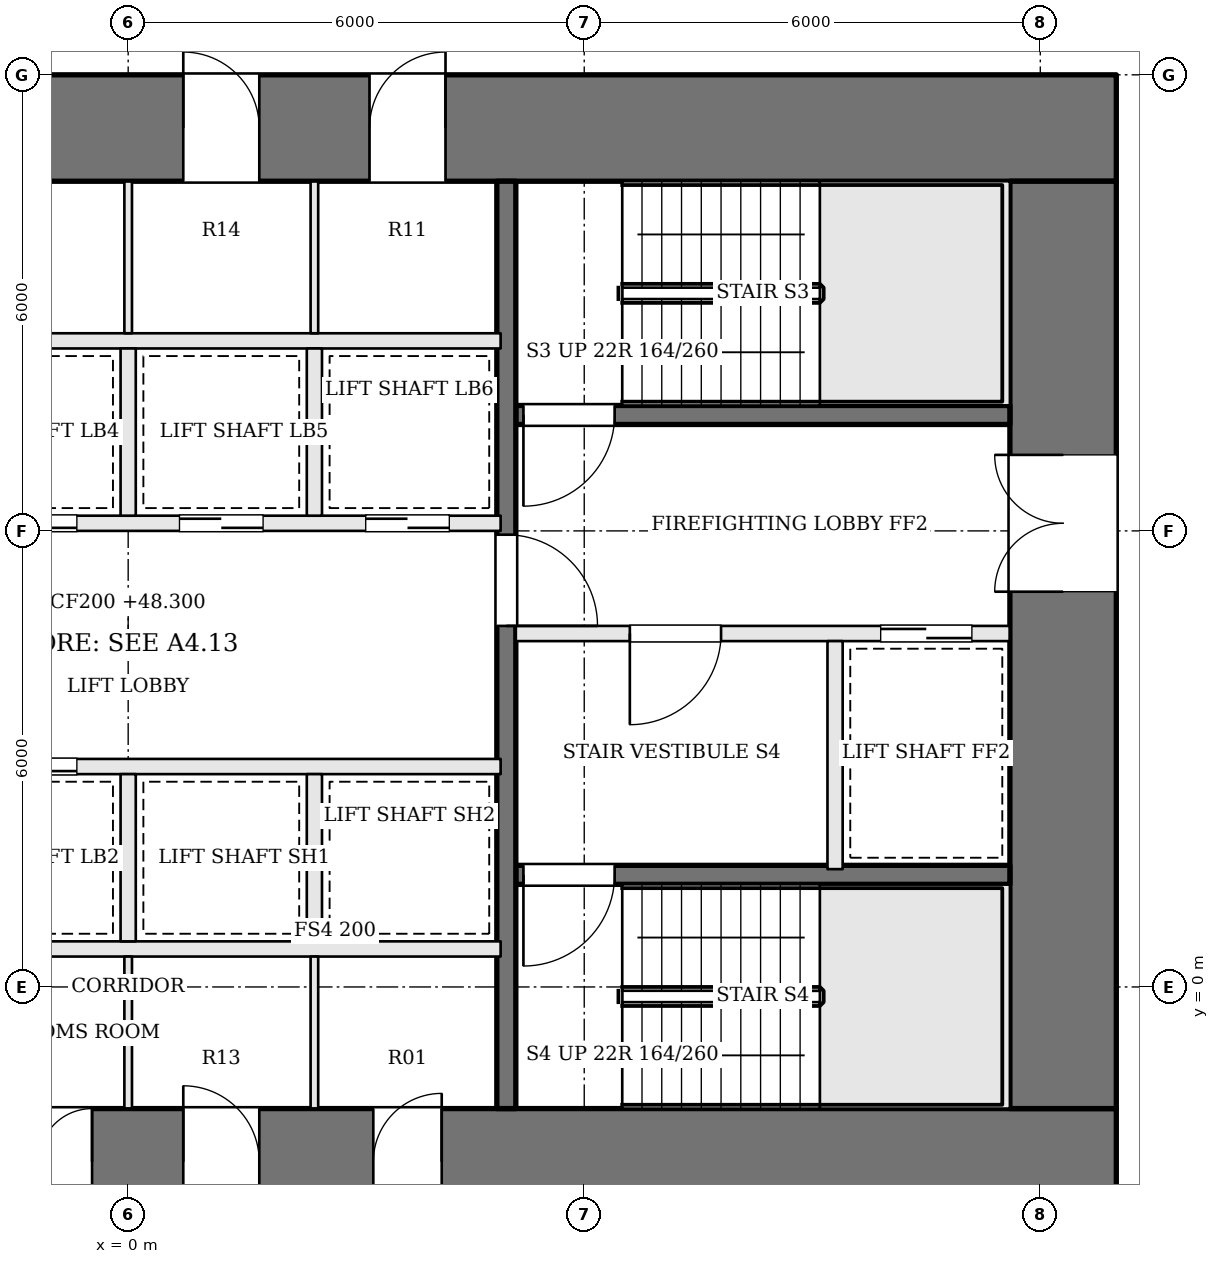
"""IFC4 building model, lengths in metres.
Left out: names, types, materials, properties, quantities, classifications, styles, units other than length and angle.
Written with IfcOpenShell. Run it as: python <this file> out.ifc"""

import sys

from ifc_helpers import new_model, si_unit, direction, frame, frame_2d, origin, place, context, subcontext, project, spatial, rectangle, extrude, element, fill, save


model = new_model("IFC4")
c1 = context("Model", 3, precision=1e-05, world=origin(), true_north=direction((0.0, 1.0)))
c2 = subcontext(c1, "Body", "Model", "MODEL_VIEW")
j1 = project(units=[si_unit("LENGTHUNIT", "METRE"), si_unit("PLANEANGLEUNIT", "RADIAN")], contexts=[c1])
p1 = place(None, origin())
s1 = spatial("IfcSite", under=j1, at=p1, CompositionType="ELEMENT")
p2 = place(p1, origin())
s2 = spatial("IfcBuilding", under=s1, at=p2, CompositionType="ELEMENT")
p3 = place(p2, frame((0.0, 0.0, 48.3)))
s3 = spatial("IfcBuildingStorey", under=s2, at=p3, CompositionType="ELEMENT", Elevation=48.3)
p4 = place(p3, frame((-13.0, 11.3, 0.0), z_axis=(0.0, 0.0, 1.0), x_axis=(1.0, 0.0, 0.0)))
e1 = element("IfcWall", 1, at=p4, inside=s3, PredefinedType="SHEAR", context=c2, shape_type="SweptSolid", body=[
    extrude(rectangle(XDim=26.0, YDim=1.4, at=frame_2d((13.0, 0.0))), origin(), (0.0, 0.0, 1.0), 3.6),
])
p5 = place(p4, frame((8.575, 0.0, 0.0)))
e2 = element("IfcOpeningElement", 2, at=p5, cuts=e1, PredefinedType="OPENING", context=c2, shape_type="SweptSolid", body=[
    extrude(rectangle(XDim=0.7, YDim=2.1, at=frame_2d((0.35, 1.05))), frame((0.0, 0.71, 0.0), z_axis=(0.0, -1.0, 0.0), x_axis=(1.0, 0.0, 0.0)), (0.0, 0.0, 1.0), 1.42),
])
p6 = place(p4, frame((10.875, 0.0, 0.0)))
e3 = element("IfcOpeningElement", 3, at=p6, cuts=e1, PredefinedType="OPENING", context=c2, shape_type="SweptSolid", body=[
    extrude(rectangle(XDim=1.0, YDim=2.1, at=frame_2d((0.5, 1.05))), frame((0.0, 0.71, 0.0), z_axis=(0.0, -1.0, 0.0), x_axis=(1.0, 0.0, 0.0)), (0.0, 0.0, 1.0), 1.42),
])
p7 = place(p4, frame((13.725, 0.0, 0.0)))
e4 = element("IfcOpeningElement", 4, at=p7, cuts=e1, PredefinedType="OPENING", context=c2, shape_type="SweptSolid", body=[
    extrude(rectangle(XDim=1.0, YDim=2.1, at=frame_2d((0.5, 1.05))), frame((0.0, 0.71, 0.0), z_axis=(0.0, -1.0, 0.0), x_axis=(1.0, 0.0, 0.0)), (0.0, 0.0, 1.0), 1.42),
])
p8 = place(p4, frame((16.175, 0.0, 0.0)))
e5 = element("IfcOpeningElement", 5, at=p8, cuts=e1, PredefinedType="OPENING", context=c2, shape_type="SweptSolid", body=[
    extrude(rectangle(XDim=1.0, YDim=2.1, at=frame_2d((0.5, 1.05))), frame((0.0, 0.71, 0.0), z_axis=(0.0, -1.0, 0.0), x_axis=(1.0, 0.0, 0.0)), (0.0, 0.0, 1.0), 1.42),
])
p9 = place(p3, frame((-13.0, -2.3, 0.0), z_axis=(0.0, 0.0, 1.0), x_axis=(1.0, 0.0, 0.0)))
e6 = element("IfcWall", 6, at=p9, inside=s3, PredefinedType="SHEAR", context=c2, shape_type="SweptSolid", body=[
    extrude(rectangle(XDim=26.0, YDim=1.4, at=frame_2d((13.0, 0.0))), origin(), (0.0, 0.0, 1.0), 3.6),
])
p10 = place(p9, frame((9.225, 0.0, 0.0)))
e7 = element("IfcOpeningElement", 7, at=p10, cuts=e6, PredefinedType="OPENING", context=c2, shape_type="SweptSolid", body=[
    extrude(rectangle(XDim=1.0, YDim=2.1, at=frame_2d((0.5, 1.05))), frame((0.0, 0.71, 0.0), z_axis=(0.0, -1.0, 0.0), x_axis=(1.0, 0.0, 0.0)), (0.0, 0.0, 1.0), 1.42),
])
p11 = place(p9, frame((11.825, 0.0, 0.0)))
e8 = element("IfcOpeningElement", 8, at=p11, cuts=e6, PredefinedType="OPENING", context=c2, shape_type="SweptSolid", body=[
    extrude(rectangle(XDim=0.7, YDim=2.1, at=frame_2d((0.35, 1.05))), frame((0.0, 0.71, 0.0), z_axis=(0.0, -1.0, 0.0), x_axis=(1.0, 0.0, 0.0)), (0.0, 0.0, 1.0), 1.42),
])
p12 = place(p9, frame((13.725, 0.0, 0.0)))
e9 = element("IfcOpeningElement", 9, at=p12, cuts=e6, PredefinedType="OPENING", context=c2, shape_type="SweptSolid", body=[
    extrude(rectangle(XDim=1.0, YDim=2.1, at=frame_2d((0.5, 1.05))), frame((0.0, 0.71, 0.0), z_axis=(0.0, -1.0, 0.0), x_axis=(1.0, 0.0, 0.0)), (0.0, 0.0, 1.0), 1.42),
])
p13 = place(p9, frame((16.225, 0.0, 0.0)))
e10 = element("IfcOpeningElement", 10, at=p13, cuts=e6, PredefinedType="OPENING", context=c2, shape_type="SweptSolid", body=[
    extrude(rectangle(XDim=0.9, YDim=2.1, at=frame_2d((0.45, 1.05))), frame((0.0, 0.71, 0.0), z_axis=(0.0, -1.0, 0.0), x_axis=(1.0, 0.0, 0.0)), (0.0, 0.0, 1.0), 1.42),
])
p14 = place(p3, frame((12.3, -1.6, 0.0), z_axis=(0.0, 0.0, 1.0), x_axis=(0.0, 1.0, 0.0)))
e11 = element("IfcWall", 11, at=p14, inside=s3, PredefinedType="SHEAR", context=c2, shape_type="SweptSolid", body=[
    extrude(rectangle(XDim=12.2, YDim=1.4, at=frame_2d((6.1, 0.0))), origin(), (0.0, 0.0, 1.0), 3.6),
])
p15 = place(p14, frame((6.8, 0.0, 0.0)))
e12 = element("IfcOpeningElement", 12, at=p15, cuts=e11, PredefinedType="OPENING", context=c2, shape_type="SweptSolid", body=[
    extrude(rectangle(XDim=1.8, YDim=2.1, at=frame_2d((0.9, 1.05))), frame((0.0, 0.71, 0.0), z_axis=(0.0, -1.0, 0.0), x_axis=(1.0, 0.0, 0.0)), (0.0, 0.0, 1.0), 1.42),
])
p16 = place(p3, frame((11.6, 7.525, 0.0), z_axis=(0.0, 0.0, 1.0), x_axis=(-1.0, 0.0, 0.0)))
e13 = element("IfcWall", 13, at=p16, inside=s3, PredefinedType="SOLIDWALL", context=c2, shape_type="SweptSolid", body=[
    extrude(rectangle(XDim=6.5, YDim=0.25, at=frame_2d((3.25, 0.0))), origin(), (0.0, 0.0, 1.0), 3.4),
])
p17 = place(p16, frame((5.2, 0.0, 0.0)))
e14 = element("IfcOpeningElement", 14, at=p17, cuts=e13, PredefinedType="OPENING", context=c2, shape_type="SweptSolid", body=[
    extrude(rectangle(XDim=1.2, YDim=2.1, at=frame_2d((0.6, 1.05))), frame((0.0, 0.135, 0.0), z_axis=(0.0, -1.0, 0.0), x_axis=(1.0, 0.0, 0.0)), (0.0, 0.0, 1.0), 0.27),
])
p18 = place(p3, frame((11.6, 4.65, 0.0), z_axis=(0.0, 0.0, 1.0), x_axis=(-1.0, 0.0, 0.0)))
e15 = element("IfcWall", 15, at=p18, inside=s3, PredefinedType="SOLIDWALL", context=c2, shape_type="SweptSolid", body=[
    extrude(rectangle(XDim=6.5, YDim=0.2, at=frame_2d((3.25, 0.0))), origin(), (0.0, 0.0, 1.0), 3.4),
])
p19 = place(p18, frame((3.8, 0.0, 0.0)))
e16 = element("IfcOpeningElement", 16, at=p19, cuts=e15, PredefinedType="OPENING", context=c2, shape_type="SweptSolid", body=[
    extrude(rectangle(XDim=1.2, YDim=2.1, at=frame_2d((0.6, 1.05))), frame((0.0, 0.11, 0.0), z_axis=(0.0, -1.0, 0.0), x_axis=(1.0, 0.0, 0.0)), (0.0, 0.0, 1.0), 0.22),
])
p20 = place(p18, frame((0.5, 0.0, 0.0)))
e17 = element("IfcOpeningElement", 17, at=p20, cuts=e15, PredefinedType="OPENING", context=c2, shape_type="SweptSolid", body=[
    extrude(rectangle(XDim=1.2, YDim=2.1, at=frame_2d((0.6, 1.05))), frame((0.0, 0.11, 0.0), z_axis=(0.0, -1.0, 0.0), x_axis=(1.0, 0.0, 0.0)), (0.0, 0.0, 1.0), 0.22),
])
p21 = place(p3, frame((11.6, 1.475, 0.0), z_axis=(0.0, 0.0, 1.0), x_axis=(-1.0, 0.0, 0.0)))
e18 = element("IfcWall", 18, at=p21, inside=s3, PredefinedType="SOLIDWALL", context=c2, shape_type="SweptSolid", body=[
    extrude(rectangle(XDim=6.5, YDim=0.25, at=frame_2d((3.25, 0.0))), origin(), (0.0, 0.0, 1.0), 3.4),
])
p22 = place(p21, frame((5.2, 0.0, 0.0)))
e19 = element("IfcOpeningElement", 19, at=p22, cuts=e18, PredefinedType="OPENING", context=c2, shape_type="SweptSolid", body=[
    extrude(rectangle(XDim=1.2, YDim=2.1, at=frame_2d((0.6, 1.05))), frame((0.0, 0.135, 0.0), z_axis=(0.0, -1.0, 0.0), x_axis=(1.0, 0.0, 0.0)), (0.0, 0.0, 1.0), 0.27),
])
p23 = place(p3, frame((9.3, 4.55, 0.0), z_axis=(0.0, 0.0, 1.0), x_axis=(0.0, -1.0, 0.0)))
e20 = element("IfcWall", 20, at=p23, inside=s3, PredefinedType="SOLIDWALL", context=c2, shape_type="SweptSolid", body=[
    extrude(rectangle(XDim=3.0, YDim=0.2, at=frame_2d((1.5, 0.0))), origin(), (0.0, 0.0, 1.0), 3.4),
])
p24 = place(p3, frame((4.975, 10.6, 0.0), z_axis=(0.0, 0.0, 1.0), x_axis=(0.0, -1.0, 0.0)))
e21 = element("IfcWall", 21, at=p24, inside=s3, PredefinedType="SOLIDWALL", context=c2, shape_type="SweptSolid", body=[
    extrude(rectangle(XDim=12.2, YDim=0.25, at=frame_2d((6.1, 0.0))), origin(), (0.0, 0.0, 1.0), 3.4),
])
p25 = place(p24, frame((4.65, 0.0, 0.0)))
e22 = element("IfcOpeningElement", 22, at=p25, cuts=e21, PredefinedType="OPENING", context=c2, shape_type="SweptSolid", body=[
    extrude(rectangle(XDim=1.2, YDim=2.1, at=frame_2d((0.6, 1.05))), frame((0.0, 0.135, 0.0), z_axis=(0.0, -1.0, 0.0), x_axis=(1.0, 0.0, 0.0)), (0.0, 0.0, 1.0), 0.27),
])
p26 = place(p3, frame((-4.9, 0.5, 0.0), z_axis=(0.0, 0.0, 1.0), x_axis=(1.0, 0.0, 0.0)))
e23 = element("IfcWall", 23, at=p26, inside=s3, PredefinedType="SOLIDWALL", context=c2, shape_type="SweptSolid", body=[
    extrude(rectangle(XDim=9.8, YDim=0.2, at=frame_2d((4.9, 0.0))), origin(), (0.0, 0.0, 1.0), 3.4),
])
p27 = place(p3, frame((-4.9, 2.9, 0.0), z_axis=(0.0, 0.0, 1.0), x_axis=(1.0, 0.0, 0.0)))
e24 = element("IfcWall", 24, at=p27, inside=s3, PredefinedType="SOLIDWALL", context=c2, shape_type="SweptSolid", body=[
    extrude(rectangle(XDim=9.8, YDim=0.2, at=frame_2d((4.9, 0.0))), origin(), (0.0, 0.0, 1.0), 3.4),
])
p28 = place(p27, frame((0.675, 0.0, 0.0)))
e25 = element("IfcOpeningElement", 25, at=p28, cuts=e24, PredefinedType="OPENING", context=c2, shape_type="SweptSolid", body=[
    extrude(rectangle(XDim=1.1, YDim=2.1, at=frame_2d((0.55, 1.05))), frame((0.0, 0.11, 0.0), z_axis=(0.0, -1.0, 0.0), x_axis=(1.0, 0.0, 0.0)), (0.0, 0.0, 1.0), 0.22),
])
p29 = place(p27, frame((3.125, 0.0, 0.0)))
e26 = element("IfcOpeningElement", 26, at=p29, cuts=e24, PredefinedType="OPENING", context=c2, shape_type="SweptSolid", body=[
    extrude(rectangle(XDim=1.1, YDim=2.1, at=frame_2d((0.55, 1.05))), frame((0.0, 0.11, 0.0), z_axis=(0.0, -1.0, 0.0), x_axis=(1.0, 0.0, 0.0)), (0.0, 0.0, 1.0), 0.22),
])
p30 = place(p3, frame((-4.9, 6.1, 0.0), z_axis=(0.0, 0.0, 1.0), x_axis=(1.0, 0.0, 0.0)))
e27 = element("IfcWall", 27, at=p30, inside=s3, PredefinedType="SOLIDWALL", context=c2, shape_type="SweptSolid", body=[
    extrude(rectangle(XDim=9.8, YDim=0.2, at=frame_2d((4.9, 0.0))), origin(), (0.0, 0.0, 1.0), 3.4),
])
p31 = place(p30, frame((0.675, 0.0, 0.0)))
e28 = element("IfcOpeningElement", 28, at=p31, cuts=e27, PredefinedType="OPENING", context=c2, shape_type="SweptSolid", body=[
    extrude(rectangle(XDim=1.1, YDim=2.1, at=frame_2d((0.55, 1.05))), frame((0.0, 0.11, 0.0), z_axis=(0.0, -1.0, 0.0), x_axis=(1.0, 0.0, 0.0)), (0.0, 0.0, 1.0), 0.22),
])
p32 = place(p30, frame((3.125, 0.0, 0.0)))
e29 = element("IfcOpeningElement", 29, at=p32, cuts=e27, PredefinedType="OPENING", context=c2, shape_type="SweptSolid", body=[
    extrude(rectangle(XDim=1.1, YDim=2.1, at=frame_2d((0.55, 1.05))), frame((0.0, 0.11, 0.0), z_axis=(0.0, -1.0, 0.0), x_axis=(1.0, 0.0, 0.0)), (0.0, 0.0, 1.0), 0.22),
])
p33 = place(p30, frame((5.575, 0.0, 0.0)))
e30 = element("IfcOpeningElement", 30, at=p33, cuts=e27, PredefinedType="OPENING", context=c2, shape_type="SweptSolid", body=[
    extrude(rectangle(XDim=1.1, YDim=2.1, at=frame_2d((0.55, 1.05))), frame((0.0, 0.11, 0.0), z_axis=(0.0, -1.0, 0.0), x_axis=(1.0, 0.0, 0.0)), (0.0, 0.0, 1.0), 0.22),
])
p34 = place(p30, frame((8.025, 0.0, 0.0)))
e31 = element("IfcOpeningElement", 31, at=p34, cuts=e27, PredefinedType="OPENING", context=c2, shape_type="SweptSolid", body=[
    extrude(rectangle(XDim=1.1, YDim=2.1, at=frame_2d((0.55, 1.05))), frame((0.0, 0.11, 0.0), z_axis=(0.0, -1.0, 0.0), x_axis=(1.0, 0.0, 0.0)), (0.0, 0.0, 1.0), 0.22),
])
p35 = place(p3, frame((-4.9, 8.5, 0.0), z_axis=(0.0, 0.0, 1.0), x_axis=(1.0, 0.0, 0.0)))
e32 = element("IfcWall", 32, at=p35, inside=s3, PredefinedType="SOLIDWALL", context=c2, shape_type="SweptSolid", body=[
    extrude(rectangle(XDim=9.8, YDim=0.2, at=frame_2d((4.9, 0.0))), origin(), (0.0, 0.0, 1.0), 3.4),
])
for number, where, z_axis, x_axis in (
    (33, (0.0, 0.6, 0.0), (0.0, 0.0, 1.0), (0.0, 1.0, 0.0)),
    (34, (2.45, 0.6, 0.0), (0.0, 0.0, 1.0), (0.0, 1.0, 0.0)),
    (35, (0.0, 6.2, 0.0), (0.0, 0.0, 1.0), (0.0, 1.0, 0.0)),
    (36, (2.45, 6.2, 0.0), (0.0, 0.0, 1.0), (0.0, 1.0, 0.0)),
):
    element("IfcWall", number, at=place(p3, frame(where, z_axis=z_axis, x_axis=x_axis)), inside=s3, PredefinedType="SOLIDWALL", context=c2, shape_type="SweptSolid", body=[
        extrude(rectangle(XDim=2.2, YDim=0.2, at=frame_2d((1.1, 0.0))), origin(), (0.0, 0.0, 1.0), 3.4),
    ])
for number, where, z_axis, x_axis in (
    (37, (0.0, -1.6, 0.0), (0.0, 0.0, 1.0), (0.0, 1.0, 0.0)),
    (38, (2.45, -1.6, 0.0), (0.0, 0.0, 1.0), (0.0, 1.0, 0.0)),
    (39, (0.0, 8.6, 0.0), (0.0, 0.0, 1.0), (0.0, 1.0, 0.0)),
    (40, (2.45, 8.6, 0.0), (0.0, 0.0, 1.0), (0.0, 1.0, 0.0)),
):
    element("IfcWall", number, at=place(p3, frame(where, z_axis=z_axis, x_axis=x_axis)), inside=s3, PredefinedType="PARTITIONING", context=c2, shape_type="SweptSolid", body=[
        extrude(rectangle(XDim=2.0, YDim=0.1, at=frame_2d((1.0, 0.0))), origin(), (0.0, 0.0, 1.0), 3.4),
    ])
p36 = place(p15, origin())
e41 = element("IfcDoor", 41, at=p36, inside=s3, OperationType="DOUBLE_DOOR_SINGLE_SWING", PredefinedType="DOOR", context=c2, shape_type="SweptSolid", body=[
    extrude(rectangle(XDim=1.8, YDim=2.1, at=frame_2d((0.9, 1.05))), frame((0.0, 0.025, 0.0), z_axis=(0.0, -1.0, 0.0), x_axis=(1.0, 0.0, 0.0)), (0.0, 0.0, 1.0), 0.05),
])
fill(e12, e41)
p37 = place(p25, origin())
e42 = element("IfcDoor", 42, at=p37, inside=s3, OperationType="SINGLE_SWING_RIGHT", PredefinedType="DOOR", context=c2, shape_type="SweptSolid", body=[
    extrude(rectangle(XDim=1.2, YDim=2.1, at=frame_2d((0.6, 1.05))), frame((0.0, 0.025, 0.0), z_axis=(0.0, -1.0, 0.0), x_axis=(1.0, 0.0, 0.0)), (0.0, 0.0, 1.0), 0.05),
])
fill(e22, e42)
p38 = place(p19, origin())
e43 = element("IfcDoor", 43, at=p38, inside=s3, OperationType="SINGLE_SWING_RIGHT", PredefinedType="DOOR", context=c2, shape_type="SweptSolid", body=[
    extrude(rectangle(XDim=1.2, YDim=2.1, at=frame_2d((0.6, 1.05))), frame((0.0, 0.025, 0.0), z_axis=(0.0, -1.0, 0.0), x_axis=(1.0, 0.0, 0.0)), (0.0, 0.0, 1.0), 0.05),
])
fill(e16, e43)
p39 = place(p17, origin())
e44 = element("IfcDoor", 44, at=p39, inside=s3, OperationType="SINGLE_SWING_RIGHT", PredefinedType="DOOR", context=c2, shape_type="SweptSolid", body=[
    extrude(rectangle(XDim=1.2, YDim=2.1, at=frame_2d((0.6, 1.05))), frame((0.0, 0.025, 0.0), z_axis=(0.0, -1.0, 0.0), x_axis=(1.0, 0.0, 0.0)), (0.0, 0.0, 1.0), 0.05),
])
fill(e14, e44)
p40 = place(p22, origin())
e45 = element("IfcDoor", 45, at=p40, inside=s3, OperationType="SINGLE_SWING_RIGHT", PredefinedType="DOOR", context=c2, shape_type="SweptSolid", body=[
    extrude(rectangle(XDim=1.2, YDim=2.1, at=frame_2d((0.6, 1.05))), frame((0.0, 0.025, 0.0), z_axis=(0.0, -1.0, 0.0), x_axis=(1.0, 0.0, 0.0)), (0.0, 0.0, 1.0), 0.05),
])
fill(e19, e45)
p41 = place(p20, origin())
e46 = element("IfcDoor", 46, at=p41, inside=s3, OperationType="SLIDING_TO_RIGHT", PredefinedType="DOOR", context=c2, shape_type="SweptSolid", body=[
    extrude(rectangle(XDim=1.2, YDim=2.1, at=frame_2d((0.6, 1.05))), frame((0.0, 0.025, 0.0), z_axis=(0.0, -1.0, 0.0), x_axis=(1.0, 0.0, 0.0)), (0.0, 0.0, 1.0), 0.05),
])
fill(e17, e46)
p42 = place(p29, origin())
e47 = element("IfcDoor", 47, at=p42, inside=s3, OperationType="SLIDING_TO_LEFT", PredefinedType="DOOR", context=c2, shape_type="SweptSolid", body=[
    extrude(rectangle(XDim=1.1, YDim=2.1, at=frame_2d((0.55, 1.05))), frame((0.0, 0.025, 0.0), z_axis=(0.0, -1.0, 0.0), x_axis=(1.0, 0.0, 0.0)), (0.0, 0.0, 1.0), 0.05),
])
fill(e26, e47)
p43 = place(p32, origin())
e48 = element("IfcDoor", 48, at=p43, inside=s3, OperationType="SLIDING_TO_LEFT", PredefinedType="DOOR", context=c2, shape_type="SweptSolid", body=[
    extrude(rectangle(XDim=1.1, YDim=2.1, at=frame_2d((0.55, 1.05))), frame((0.0, 0.025, 0.0), z_axis=(0.0, -1.0, 0.0), x_axis=(1.0, 0.0, 0.0)), (0.0, 0.0, 1.0), 0.05),
])
fill(e29, e48)
p44 = place(p33, origin())
e49 = element("IfcDoor", 49, at=p44, inside=s3, OperationType="SLIDING_TO_RIGHT", PredefinedType="DOOR", context=c2, shape_type="SweptSolid", body=[
    extrude(rectangle(XDim=1.1, YDim=2.1, at=frame_2d((0.55, 1.05))), frame((0.0, 0.025, 0.0), z_axis=(0.0, -1.0, 0.0), x_axis=(1.0, 0.0, 0.0)), (0.0, 0.0, 1.0), 0.05),
])
fill(e30, e49)
p45 = place(p34, origin())
e50 = element("IfcDoor", 50, at=p45, inside=s3, OperationType="SLIDING_TO_LEFT", PredefinedType="DOOR", context=c2, shape_type="SweptSolid", body=[
    extrude(rectangle(XDim=1.1, YDim=2.1, at=frame_2d((0.55, 1.05))), frame((0.0, 0.025, 0.0), z_axis=(0.0, -1.0, 0.0), x_axis=(1.0, 0.0, 0.0)), (0.0, 0.0, 1.0), 0.05),
])
fill(e31, e50)
p46 = place(p11, origin())
e51 = element("IfcDoor", 51, at=p46, inside=s3, OperationType="SINGLE_SWING_RIGHT", PredefinedType="DOOR", context=c2, shape_type="SweptSolid", body=[
    extrude(rectangle(XDim=0.7, YDim=2.1, at=frame_2d((0.35, 1.05))), frame((0.0, 0.025, 0.0), z_axis=(0.0, -1.0, 0.0), x_axis=(1.0, 0.0, 0.0)), (0.0, 0.0, 1.0), 0.05),
])
fill(e8, e51)
p47 = place(p12, origin())
e52 = element("IfcDoor", 52, at=p47, inside=s3, OperationType="SINGLE_SWING_LEFT", PredefinedType="DOOR", context=c2, shape_type="SweptSolid", body=[
    extrude(rectangle(XDim=1.0, YDim=2.1, at=frame_2d((0.5, 1.05))), frame((0.0, 0.025, 0.0), z_axis=(0.0, -1.0, 0.0), x_axis=(1.0, 0.0, 0.0)), (0.0, 0.0, 1.0), 0.05),
])
fill(e9, e52)
p48 = place(p13, origin())
e53 = element("IfcDoor", 53, at=p48, inside=s3, OperationType="SINGLE_SWING_RIGHT", PredefinedType="DOOR", context=c2, shape_type="SweptSolid", body=[
    extrude(rectangle(XDim=0.9, YDim=2.1, at=frame_2d((0.45, 1.05))), frame((0.0, 0.025, 0.0), z_axis=(0.0, -1.0, 0.0), x_axis=(1.0, 0.0, 0.0)), (0.0, 0.0, 1.0), 0.05),
])
fill(e10, e53)
p49 = place(p7, origin())
e54 = element("IfcDoor", 54, at=p49, inside=s3, OperationType="SINGLE_SWING_LEFT", PredefinedType="DOOR", context=c2, shape_type="SweptSolid", body=[
    extrude(rectangle(XDim=1.0, YDim=2.1, at=frame_2d((0.5, 1.05))), frame((0.0, 0.025, 0.0), z_axis=(0.0, -1.0, 0.0), x_axis=(1.0, 0.0, 0.0)), (0.0, 0.0, 1.0), 0.05),
])
fill(e4, e54)
p50 = place(p8, origin())
e55 = element("IfcDoor", 55, at=p50, inside=s3, OperationType="SINGLE_SWING_RIGHT", PredefinedType="DOOR", context=c2, shape_type="SweptSolid", body=[
    extrude(rectangle(XDim=1.0, YDim=2.1, at=frame_2d((0.5, 1.05))), frame((0.0, 0.025, 0.0), z_axis=(0.0, -1.0, 0.0), x_axis=(1.0, 0.0, 0.0)), (0.0, 0.0, 1.0), 0.05),
])
fill(e5, e55)
save(model, sys.argv[1])
